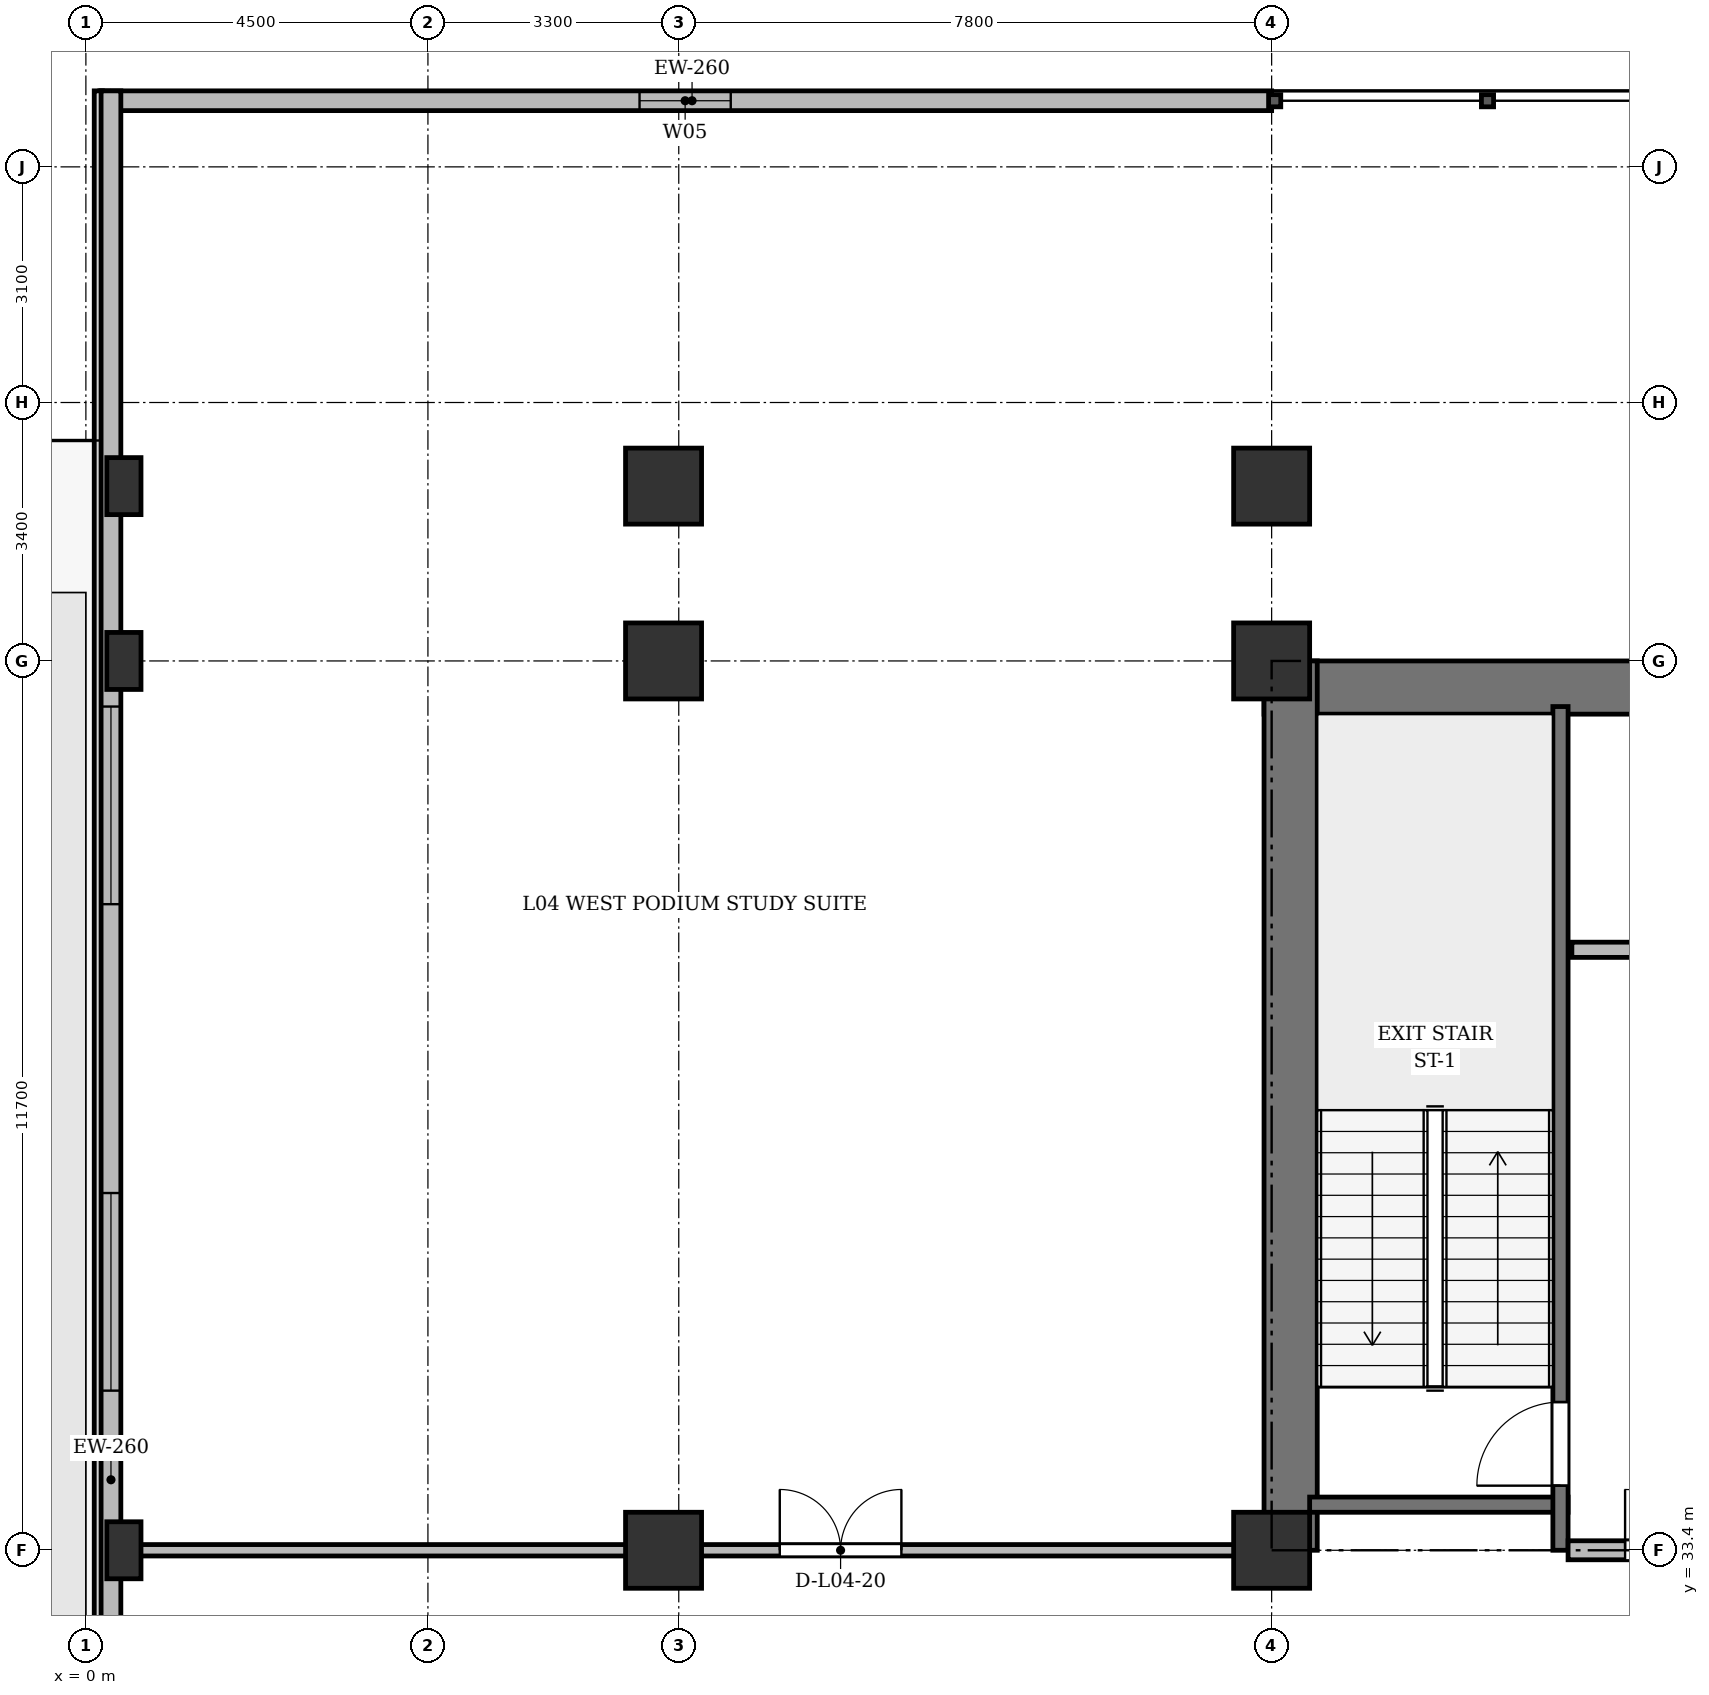
"""IFC4 building model, lengths in metres.
Left out: names, types, materials, properties, quantities, classifications, styles, units other than length and angle.
Written with IfcOpenShell. Run it as: python <this file> out.ifc"""

import sys

from ifc_helpers import new_model, si_unit, direction, frame, frame_2d, origin, origin_2d, place, context, subcontext, project, spatial, rectangle, extrude, source, transform, mapped, element, fill, save


model = new_model("IFC4")
c1 = context("Model", 3, precision=1e-05, world=origin(), true_north=direction((0.0, 1.0)))
c2 = subcontext(c1, "Body", "Model", "MODEL_VIEW")
j1 = project(units=[si_unit("LENGTHUNIT", "METRE"), si_unit("PLANEANGLEUNIT", "RADIAN")], contexts=[c1])
p1 = place(None, origin())
s1 = spatial("IfcSite", under=j1, at=p1, CompositionType="ELEMENT")
p2 = place(p1, origin())
s2 = spatial("IfcBuilding", under=s1, at=p2, CompositionType="ELEMENT")
p3 = place(p2, frame((0.0, 0.0, 18.7)))
s3 = spatial("IfcBuildingStorey", under=s2, at=p3, CompositionType="ELEMENT", Elevation=18.7)
m1 = source(origin(), c2, "Body", "SweptSolid", [
    extrude(rectangle(XDim=0.45, YDim=0.75, at=origin_2d()), origin(), (0.0, 0.0, 1.0), 4.8),
])
for number, where, z_axis, x_axis in (
    (1, (0.5, 33.4, 0.0), (0.0, 0.0, 1.0), (1.0, 0.0, 0.0)),
    (2, (0.5, 45.1, 0.0), (0.0, 0.0, 1.0), (1.0, 0.0, 0.0)),
    (3, (0.5, 47.4, 0.0), (0.0, 0.0, 1.0), (1.0, 0.0, 0.0)),
):
    element("IfcColumn", number, at=place(p3, frame(where, z_axis=z_axis, x_axis=x_axis)), inside=s3, PredefinedType="PILASTER", context=c2, shape_type="MappedRepresentation", body=[
        mapped(m1, transform((0.0, 0.0, 0.0), x_axis=(1.0, 0.0, 0.0), y_axis=(0.0, 1.0, 0.0), z_axis=(0.0, 0.0, 1.0), scale=1.0)),
    ])
m2 = source(origin(), c2, "Body", "SweptSolid", [
    extrude(rectangle(XDim=1.0, YDim=1.0, at=origin_2d()), origin(), (0.0, 0.0, 1.0), 4.8),
])
for number, where, z_axis, x_axis in (
    (4, (7.6, 33.4, 0.0), (0.0, 0.0, 1.0), (1.0, 0.0, 0.0)),
    (5, (7.6, 45.1, 0.0), (0.0, 0.0, 1.0), (1.0, 0.0, 0.0)),
    (6, (7.6, 47.4, 0.0), (0.0, 0.0, 1.0), (1.0, 0.0, 0.0)),
    (7, (15.6, 33.4, 0.0), (0.0, 0.0, 1.0), (1.0, 0.0, 0.0)),
    (8, (15.6, 45.1, 0.0), (0.0, 0.0, 1.0), (1.0, 0.0, 0.0)),
    (9, (15.6, 47.4, 0.0), (0.0, 0.0, 1.0), (1.0, 0.0, 0.0)),
):
    element("IfcColumn", number, at=place(p3, frame(where, z_axis=z_axis, x_axis=x_axis)), inside=s3, PredefinedType="COLUMN", context=c2, shape_type="MappedRepresentation", body=[
        mapped(m2, transform((0.0, 0.0, 0.0), x_axis=(1.0, 0.0, 0.0), y_axis=(0.0, 1.0, 0.0), z_axis=(0.0, 0.0, 1.0), scale=1.0)),
    ])
p4 = place(p3, frame((0.35, 52.47, 0.0), z_axis=(0.0, 0.0, 1.0), x_axis=(1.0, 0.0, 0.0)))
e10 = element("IfcWall", 10, at=p4, inside=s3, PredefinedType="SOLIDWALL", context=c2, shape_type="SweptSolid", body=[
    extrude(rectangle(XDim=15.25, YDim=0.26, at=frame_2d((7.625, 0.0))), origin(), (0.0, 0.0, 1.0), 4.42),
])
p5 = place(p4, frame((6.934, 0.0, 0.9)))
e11 = element("IfcOpeningElement", 11, at=p5, cuts=e10, PredefinedType="OPENING", context=c2, shape_type="SweptSolid", body=[
    extrude(rectangle(XDim=1.2, YDim=1.65, at=frame_2d((0.6, 0.825))), frame((0.0, 0.14, 0.0), z_axis=(0.0, -1.0, 0.0), x_axis=(1.0, 0.0, 0.0)), (0.0, 0.0, 1.0), 0.28),
])
p6 = place(p3, frame((0.33, 1.6, 0.0), z_axis=(0.0, 0.0, 1.0), x_axis=(0.0, 1.0, 0.0)))
e12 = element("IfcWall", 12, at=p6, inside=s3, PredefinedType="SOLIDWALL", context=c2, shape_type="SweptSolid", body=[
    extrude(rectangle(XDim=51.0, YDim=0.26, at=frame_2d((25.5, 0.0))), origin(), (0.0, 0.0, 1.0), 2.62),
])
p7 = place(p6, frame((12.655, 0.0, 0.0)))
e13 = element("IfcOpeningElement", 13, at=p7, cuts=e12, PredefinedType="OPENING", context=c2, shape_type="SweptSolid", body=[
    extrude(rectangle(XDim=1.5, YDim=2.25, at=frame_2d((0.75, 1.125))), frame((0.0, 0.14, 0.0), z_axis=(0.0, -1.0, 0.0), x_axis=(1.0, 0.0, 0.0)), (0.0, 0.0, 1.0), 0.28),
])
p8 = place(p6, frame((3.6, 0.0, 0.92)))
e14 = element("IfcOpeningElement", 14, at=p8, cuts=e12, PredefinedType="OPENING", context=c2, shape_type="SweptSolid", body=[
    extrude(rectangle(XDim=2.6, YDim=1.6, at=frame_2d((1.3, 0.8))), frame((0.0, 0.14, 0.0), z_axis=(0.0, -1.0, 0.0), x_axis=(1.0, 0.0, 0.0)), (0.0, 0.0, 1.0), 0.28),
])
p9 = place(p6, frame((17.6, 0.0, 0.92)))
e15 = element("IfcOpeningElement", 15, at=p9, cuts=e12, PredefinedType="OPENING", context=c2, shape_type="SweptSolid", body=[
    extrude(rectangle(XDim=2.6, YDim=1.6, at=frame_2d((1.3, 0.8))), frame((0.0, 0.14, 0.0), z_axis=(0.0, -1.0, 0.0), x_axis=(1.0, 0.0, 0.0)), (0.0, 0.0, 1.0), 0.28),
])
p10 = place(p6, frame((33.9, 0.0, 0.92)))
e16 = element("IfcOpeningElement", 16, at=p10, cuts=e12, PredefinedType="OPENING", context=c2, shape_type="SweptSolid", body=[
    extrude(rectangle(XDim=2.6, YDim=1.6, at=frame_2d((1.3, 0.8))), frame((0.0, 0.14, 0.0), z_axis=(0.0, -1.0, 0.0), x_axis=(1.0, 0.0, 0.0)), (0.0, 0.0, 1.0), 0.28),
])
p11 = place(p6, frame((40.3, 0.0, 0.92)))
e17 = element("IfcOpeningElement", 17, at=p11, cuts=e12, PredefinedType="OPENING", context=c2, shape_type="SweptSolid", body=[
    extrude(rectangle(XDim=2.6, YDim=1.6, at=frame_2d((1.3, 0.8))), frame((0.0, 0.14, 0.0), z_axis=(0.0, -1.0, 0.0), x_axis=(1.0, 0.0, 0.0)), (0.0, 0.0, 1.0), 0.28),
])
p12 = place(p3, frame((15.5, 44.75, 0.0), z_axis=(0.0, 0.0, 1.0), x_axis=(1.0, 0.0, 0.0)))
e18 = element("IfcWall", 18, at=p12, inside=s3, PredefinedType="SHEAR", context=c2, shape_type="SweptSolid", body=[
    extrude(rectangle(XDim=43.4, YDim=0.7, at=frame_2d((21.7, 0.0))), origin(), (0.0, 0.0, 1.0), 4.42),
])
p13 = place(p3, frame((15.85, 33.4, 0.0), z_axis=(0.0, 0.0, 1.0), x_axis=(0.0, 1.0, 0.0)))
e19 = element("IfcWall", 19, at=p13, inside=s3, PredefinedType="SHEAR", context=c2, shape_type="SweptSolid", body=[
    extrude(rectangle(XDim=11.7, YDim=0.7, at=frame_2d((5.85, 0.0))), origin(), (0.0, 0.0, 1.0), 4.42),
])
p14 = place(p3, frame((16.1, 34.0, 0.0), z_axis=(0.0, 0.0, 1.0), x_axis=(1.0, 0.0, 0.0)))
e20 = element("IfcWall", 20, at=p14, inside=s3, PredefinedType="SHEAR", context=c2, shape_type="SweptSolid", body=[
    extrude(rectangle(XDim=3.4, YDim=0.2, at=frame_2d((1.7, 0.0))), origin(), (0.0, 0.0, 1.0), 4.42),
])
p15 = place(p3, frame((19.4, 33.4, 0.0), z_axis=(0.0, 0.0, 1.0), x_axis=(0.0, 1.0, 0.0)))
e21 = element("IfcWall", 21, at=p15, inside=s3, PredefinedType="SHEAR", context=c2, shape_type="SweptSolid", body=[
    extrude(rectangle(XDim=11.1, YDim=0.2, at=frame_2d((5.55, 0.0))), origin(), (0.0, 0.0, 1.0), 4.42),
])
p16 = place(p15, frame((0.85, 0.0, 0.0)))
e22 = element("IfcOpeningElement", 22, at=p16, cuts=e21, PredefinedType="OPENING", context=c2, shape_type="SweptSolid", body=[
    extrude(rectangle(XDim=1.1, YDim=2.15, at=frame_2d((0.55, 1.075))), frame((0.0, 0.11, 0.0), z_axis=(0.0, -1.0, 0.0), x_axis=(1.0, 0.0, 0.0)), (0.0, 0.0, 1.0), 0.22),
])
p17 = place(p3, frame((19.55, 41.3, 0.0), z_axis=(0.0, 0.0, 1.0), x_axis=(1.0, 0.0, 0.0)))
e23 = element("IfcWall", 23, at=p17, inside=s3, PredefinedType="SOLIDWALL", context=c2, shape_type="SweptSolid", body=[
    extrude(rectangle(XDim=6.75, YDim=0.2, at=frame_2d((3.375, 0.0))), origin(), (0.0, 0.0, 1.0), 4.42),
])
p18 = place(p17, frame((1.7, 0.0, 0.0)))
e24 = element("IfcOpeningElement", 24, at=p18, cuts=e23, PredefinedType="OPENING", context=c2, shape_type="SweptSolid", body=[
    extrude(rectangle(XDim=1.1, YDim=2.15, at=frame_2d((0.55, 1.075))), frame((0.0, 0.11, 0.0), z_axis=(0.0, -1.0, 0.0), x_axis=(1.0, 0.0, 0.0)), (0.0, 0.0, 1.0), 0.22),
])
p19 = place(p17, frame((4.4, 0.0, 0.0)))
e25 = element("IfcOpeningElement", 25, at=p19, cuts=e23, PredefinedType="OPENING", context=c2, shape_type="SweptSolid", body=[
    extrude(rectangle(XDim=1.1, YDim=2.15, at=frame_2d((0.55, 1.075))), frame((0.0, 0.11, 0.0), z_axis=(0.0, -1.0, 0.0), x_axis=(1.0, 0.0, 0.0)), (0.0, 0.0, 1.0), 0.22),
])
p20 = place(p3, frame((19.5, 33.4, 0.0), z_axis=(0.0, 0.0, 1.0), x_axis=(1.0, 0.0, 0.0)))
e26 = element("IfcWall", 26, at=p20, inside=s3, PredefinedType="PARTITIONING", context=c2, shape_type="SweptSolid", body=[
    extrude(rectangle(XDim=6.8, YDim=0.25, at=frame_2d((3.4, 0.0))), origin(), (0.0, 0.0, 1.0), 2.62),
])
p21 = place(p20, frame((0.75, 0.0, 0.0)))
e27 = element("IfcOpeningElement", 27, at=p21, cuts=e26, PredefinedType="OPENING", context=c2, shape_type="SweptSolid", body=[
    extrude(rectangle(XDim=1.6, YDim=2.2, at=frame_2d((0.8, 1.1))), frame((0.0, 0.135, 0.0), z_axis=(0.0, -1.0, 0.0), x_axis=(1.0, 0.0, 0.0)), (0.0, 0.0, 1.0), 0.27),
])
p22 = place(p3, frame((0.45, 33.4, 0.0), z_axis=(0.0, 0.0, 1.0), x_axis=(1.0, 0.0, 0.0)))
e28 = element("IfcWall", 28, at=p22, inside=s3, PredefinedType="PARTITIONING", context=c2, shape_type="SweptSolid", body=[
    extrude(rectangle(XDim=15.35, YDim=0.15, at=frame_2d((7.675, 0.0))), origin(), (0.0, 0.0, 1.0), 2.62),
])
p23 = place(p22, frame((8.679, 0.0, 0.0)))
e29 = element("IfcOpeningElement", 29, at=p23, cuts=e28, PredefinedType="OPENING", context=c2, shape_type="SweptSolid", body=[
    extrude(rectangle(XDim=1.6, YDim=2.2, at=frame_2d((0.8, 1.1))), frame((0.0, 0.085, 0.0), z_axis=(0.0, -1.0, 0.0), x_axis=(1.0, 0.0, 0.0)), (0.0, 0.0, 1.0), 0.17),
])
m3 = source(origin(), c2, "Body", "SweptSolid", [
    extrude(rectangle(XDim=1.2, YDim=1.65, at=frame_2d((0.6, 0.825))), frame((0.0, 0.03, 0.0), z_axis=(0.0, -1.0, 0.0), x_axis=(1.0, 0.0, 0.0)), (0.0, 0.0, 1.0), 0.06),
])
p24 = place(p5, origin())
e30 = element("IfcWindow", 30, at=p24, inside=s3, PartitioningType="SINGLE_PANEL", PredefinedType="WINDOW", context=c2, shape_type="MappedRepresentation", body=[
    mapped(m3, transform((0.0, 0.0, 0.0), x_axis=(1.0, 0.0, 0.0), y_axis=(0.0, 1.0, 0.0), z_axis=(0.0, 0.0, 1.0), scale=1.0)),
])
fill(e11, e30)
m4 = source(origin(), c2, "Body", "SweptSolid", [
    extrude(rectangle(XDim=2.6, YDim=1.6, at=frame_2d((1.3, 0.8))), frame((0.0, 0.03, 0.0), z_axis=(0.0, -1.0, 0.0), x_axis=(1.0, 0.0, 0.0)), (0.0, 0.0, 1.0), 0.06),
])
p25 = place(p10, origin())
e31 = element("IfcWindow", 31, at=p25, inside=s3, PartitioningType="SINGLE_PANEL", PredefinedType="WINDOW", context=c2, shape_type="MappedRepresentation", body=[
    mapped(m4, transform((0.0, 0.0, 0.0), x_axis=(1.0, 0.0, 0.0), y_axis=(0.0, 1.0, 0.0), z_axis=(0.0, 0.0, 1.0), scale=1.0)),
])
fill(e16, e31)
p26 = place(p11, origin())
e32 = element("IfcWindow", 32, at=p26, inside=s3, PartitioningType="SINGLE_PANEL", PredefinedType="WINDOW", context=c2, shape_type="MappedRepresentation", body=[
    mapped(m4, transform((0.0, 0.0, 0.0), x_axis=(1.0, 0.0, 0.0), y_axis=(0.0, 1.0, 0.0), z_axis=(0.0, 0.0, 1.0), scale=1.0)),
])
fill(e17, e32)
m5 = source(origin(), c2, "Body", "SweptSolid", [
    extrude(rectangle(XDim=1.1, YDim=2.15, at=frame_2d((0.55, 1.075))), frame((0.0, 0.025, 0.0), z_axis=(0.0, -1.0, 0.0), x_axis=(1.0, 0.0, 0.0)), (0.0, 0.0, 1.0), 0.05),
])
p27 = place(p16, origin())
e33 = element("IfcDoor", 33, at=p27, inside=s3, OperationType="SINGLE_SWING_LEFT", PredefinedType="DOOR", context=c2, shape_type="MappedRepresentation", body=[
    mapped(m5, transform((0.0, 0.0, 0.0), x_axis=(1.0, 0.0, 0.0), y_axis=(0.0, 1.0, 0.0), z_axis=(0.0, 0.0, 1.0), scale=1.0)),
])
fill(e22, e33)
m6 = source(origin(), c2, "Body", "SweptSolid", [
    extrude(rectangle(XDim=1.6, YDim=2.2, at=frame_2d((0.8, 1.1))), frame((0.0, 0.025, 0.0), z_axis=(0.0, -1.0, 0.0), x_axis=(1.0, 0.0, 0.0)), (0.0, 0.0, 1.0), 0.05),
])
p28 = place(p21, origin())
e34 = element("IfcDoor", 34, at=p28, inside=s3, OperationType="DOUBLE_DOOR_SINGLE_SWING", PredefinedType="DOOR", context=c2, shape_type="MappedRepresentation", body=[
    mapped(m6, transform((0.0, 0.0, 0.0), x_axis=(1.0, 0.0, 0.0), y_axis=(0.0, 1.0, 0.0), z_axis=(0.0, 0.0, 1.0), scale=1.0)),
])
fill(e27, e34)
p29 = place(p23, origin())
e35 = element("IfcDoor", 35, at=p29, inside=s3, OperationType="DOUBLE_DOOR_SINGLE_SWING", PredefinedType="DOOR", context=c2, shape_type="MappedRepresentation", body=[
    mapped(m6, transform((0.0, 0.0, 0.0), x_axis=(1.0, 0.0, 0.0), y_axis=(0.0, 1.0, 0.0), z_axis=(0.0, 0.0, 1.0), scale=1.0)),
])
fill(e29, e35)
save(model, sys.argv[1])
